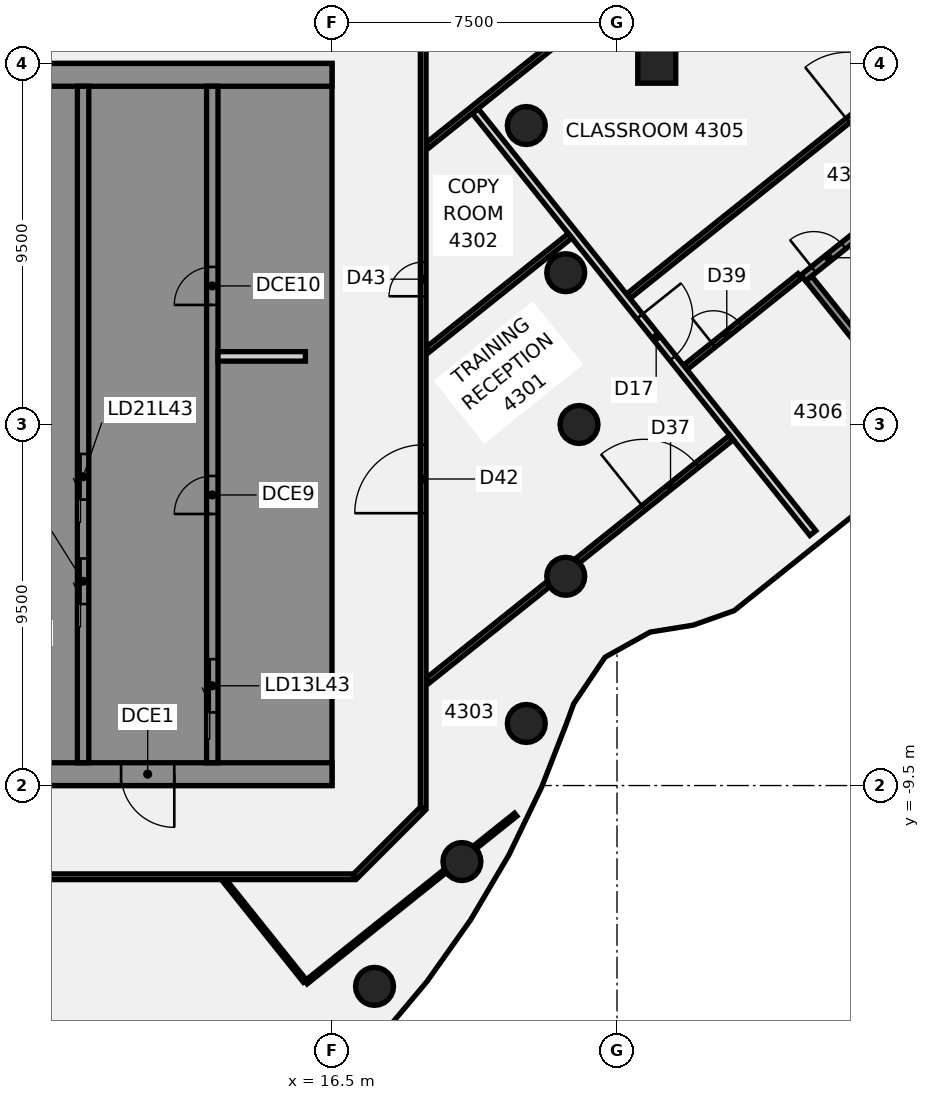
"""IFC4 building model, lengths in metres.
Left out: names, types, materials, properties, quantities, classifications, styles, units other than length and angle.
Written with IfcOpenShell. Run it as: python <this file> out.ifc"""

import sys

from ifc_helpers import new_model, si_unit, direction, frame, frame_2d, origin, origin_2d, place, context, subcontext, project, spatial, polyline, rectangle, circle, outline, extrude, element, fill, save


model = new_model("IFC4")
c1 = context("Model", 3, precision=1e-05, world=origin(), true_north=direction((0.0, 1.0)))
c2 = subcontext(c1, "Body", "Model", "MODEL_VIEW")
j1 = project(units=[si_unit("LENGTHUNIT", "METRE"), si_unit("PLANEANGLEUNIT", "RADIAN")], contexts=[c1])
p1 = place(None, origin())
s1 = spatial("IfcSite", under=j1, at=p1, CompositionType="ELEMENT")
p2 = place(p1, origin())
s2 = spatial("IfcBuilding", under=s1, at=p2, CompositionType="ELEMENT")
p3 = place(p2, frame((0.0, 0.0, 174.25)))
s3 = spatial("IfcBuildingStorey", under=s2, at=p3, CompositionType="ELEMENT", Elevation=174.25)
for number, where, z_axis, x_axis in (
    (1, (23.0, 0.0, -0.14), (0.0, 0.0, 1.0), (1.0, 0.0, 0.0)),
    (2, (22.651, 3.994, -0.14), (0.0, 0.0, 1.0), (1.0, 0.0, 0.0)),
    (3, (21.613, 7.866, -0.14), (0.0, 0.0, 1.0), (1.0, 0.0, 0.0)),
    (4, (17.619, -14.784, -0.14), (0.0, 0.0, 1.0), (1.0, 0.0, 0.0)),
    (5, (19.919, -11.5, -0.14), (0.0, 0.0, 1.0), (1.0, 0.0, 0.0)),
    (6, (21.613, -7.866, -0.14), (0.0, 0.0, 1.0), (1.0, 0.0, 0.0)),
    (7, (22.651, -3.994, -0.14), (0.0, 0.0, 1.0), (1.0, 0.0, 0.0)),
):
    element("IfcColumn", number, at=place(p3, frame(where, z_axis=z_axis, x_axis=x_axis)), inside=s3, PredefinedType="COLUMN", context=c2, shape_type="SweptSolid", body=[
        extrude(circle(Radius=0.5, at=origin_2d()), origin(), (0.0, 0.0, 1.0), 3.71),
    ])
p4 = place(p3, frame((25.046, 9.48, -0.139), z_axis=(-0.04664661088, 0.014535771096, 0.998805689337), x_axis=(0.623471160902, -0.780797686808, 0.040480659568)))
e8 = element("IfcColumn", 8, at=p4, inside=s3, PredefinedType="COLUMN", context=c2, shape_type="SweptSolid", body=[
    extrude(rectangle(XDim=1.0, YDim=1.0, at=origin_2d()), origin(), (0.0, 0.0, 1.0), 3.695),
])
p5 = place(p3, frame((1.725, -11.99, 0.0), z_axis=(0.0, 0.0, 1.0), x_axis=(0.624690839768, -0.780872175654, 0.0)))
e9 = element("IfcWall", 9, at=p5, inside=s3, PredefinedType="PARTITIONING", context=c2, shape_type="SweptSolid", body=[
    extrude(rectangle(XDim=14.152, YDim=0.1, at=frame_2d((7.076, 0.0))), origin(), (0.0, 0.0, 1.0), 2.97),
])
p6 = place(p3, frame((13.663, -11.99, 0.0), z_axis=(0.0, 0.0, 1.0), x_axis=(0.624651201182, -0.780903884522, 0.0)))
e10 = element("IfcWall", 10, at=p6, inside=s3, PredefinedType="PARTITIONING", context=c2, shape_type="SweptSolid", body=[
    extrude(rectangle(XDim=3.395, YDim=0.1, at=frame_2d((1.698, 0.0))), origin(), (0.0, 0.0, 1.0), 2.97),
])
p7 = place(p3, frame((20.27, 8.247, 0.0), z_axis=(0.0, 0.0, 1.0), x_axis=(0.624684578179, -0.780877184828, 0.0)))
e11 = element("IfcWall", 11, at=p7, inside=s3, PredefinedType="PARTITIONING", context=c2, shape_type="SweptSolid", body=[
    extrude(rectangle(XDim=14.219, YDim=0.2, at=frame_2d((7.11, 0.0))), origin(), (0.0, 0.0, 1.0), 2.87),
])
p8 = place(p7, frame((6.92, 0.0, 0.0)))
e12 = element("IfcOpeningElement", 12, at=p8, cuts=e11, PredefinedType="OPENING", context=c2, shape_type="SweptSolid", body=[
    extrude(rectangle(XDim=1.4, YDim=2.1, at=frame_2d((0.7, 1.05))), frame((0.0, 0.11, 0.0), z_axis=(0.0, -1.0, 0.0), x_axis=(1.0, 0.0, 0.0)), (0.0, 0.0, 1.0), 0.22),
])
p9 = place(p3, frame((-17.1, -11.9, 0.0), z_axis=(0.0, 0.0, 1.0), x_axis=(1.0, 0.0, 0.0)))
e13 = element("IfcWall", 13, at=p9, inside=s3, PredefinedType="PARTITIONING", context=c2, shape_type="SweptSolid", body=[
    extrude(rectangle(XDim=34.165, YDim=0.15, at=frame_2d((17.083, 0.0))), origin(), (0.0, 0.0, 1.0), 2.97),
])
p10 = place(p9, frame((9.414, 0.0, 0.0)))
e14 = element("IfcOpeningElement", 14, at=p10, cuts=e13, PredefinedType="OPENING", context=c2, shape_type="SweptSolid", body=[
    extrude(rectangle(XDim=1.8, YDim=2.1, at=frame_2d((0.9, 1.05))), frame((0.0, 0.085, 0.0), z_axis=(0.0, -1.0, 0.0), x_axis=(1.0, 0.0, 0.0)), (0.0, 0.0, 1.0), 0.17),
])
p11 = place(p9, frame((2.1, 0.0, 0.0)))
e15 = element("IfcOpeningElement", 15, at=p11, cuts=e13, PredefinedType="OPENING", context=c2, shape_type="SweptSolid", body=[
    extrude(rectangle(XDim=1.8, YDim=2.1, at=frame_2d((0.9, 1.05))), frame((0.0, 0.085, 0.0), z_axis=(0.0, -1.0, 0.0), x_axis=(1.0, 0.0, 0.0)), (0.0, 0.0, 1.0), 0.17),
])
p12 = place(p9, frame((23.853, 0.0, 0.0)))
e16 = element("IfcOpeningElement", 16, at=p12, cuts=e13, PredefinedType="OPENING", context=c2, shape_type="SweptSolid", body=[
    extrude(rectangle(XDim=1.8, YDim=2.1, at=frame_2d((0.9, 1.05))), frame((0.0, 0.085, 0.0), z_axis=(0.0, -1.0, 0.0), x_axis=(1.0, 0.0, 0.0)), (0.0, 0.0, 1.0), 0.17),
])
p13 = place(p3, frame((15.815, -14.68, 0.0), z_axis=(0.0, 0.0, 1.0), x_axis=(0.780939933327, 0.624606132323, 0.0)))
e17 = element("IfcWall", 17, at=p13, inside=s3, PredefinedType="PARTITIONING", context=c2, shape_type="SweptSolid", body=[
    extrude(rectangle(XDim=4.688, YDim=0.1, at=frame_2d((2.344, 0.0))), origin(), (0.0, 0.0, 1.0), 2.97),
])
p14 = place(p3, frame((20.249, -11.134, 0.0), z_axis=(0.0, 0.0, 1.0), x_axis=(0.780920261551, 0.62463072699, 0.0)))
e18 = element("IfcWall", 18, at=p14, inside=s3, PredefinedType="PARTITIONING", context=c2, shape_type="SweptSolid", body=[
    extrude(rectangle(XDim=1.389, YDim=0.1, at=frame_2d((0.694, 0.0))), origin(), (0.0, 0.0, 1.0), 2.97),
])
p15 = place(p3, frame((19.005, -6.75, 0.0), z_axis=(0.0, 0.0, 1.0), x_axis=(0.780862978875, 0.624702335694, 0.0)))
e19 = element("IfcWall", 19, at=p15, inside=s3, PredefinedType="PARTITIONING", context=c2, shape_type="SweptSolid", body=[
    extrude(rectangle(XDim=4.085, YDim=0.15, at=frame_2d((2.042, 0.0))), origin(), (0.0, 0.0, 1.0), 2.97),
])
p16 = place(p3, frame((22.948, -3.595, 0.0), z_axis=(0.0, 0.0, 1.0), x_axis=(0.780855081302, 0.624712207344, 0.0)))
e20 = element("IfcWall", 20, at=p16, inside=s3, PredefinedType="PARTITIONING", context=c2, shape_type="SweptSolid", body=[
    extrude(rectangle(XDim=5.205, YDim=0.15, at=frame_2d((2.603, 0.0))), origin(), (0.0, 0.0, 1.0), 2.97),
])
p17 = place(p16, frame((2.25, 0.0, 0.0)))
e21 = element("IfcOpeningElement", 21, at=p17, cuts=e20, PredefinedType="OPENING", context=c2, shape_type="SweptSolid", body=[
    extrude(rectangle(XDim=1.8, YDim=2.1, at=frame_2d((0.9, 1.05))), frame((0.0, 0.085, 0.0), z_axis=(0.0, -1.0, 0.0), x_axis=(1.0, 0.0, 0.0)), (0.0, 0.0, 1.0), 0.17),
])
p18 = place(p3, frame((19.005, 1.958, 0.0), z_axis=(0.0, 0.0, 1.0), x_axis=(0.780878701352, 0.624682682468, 0.0)))
e22 = element("IfcWall", 22, at=p18, inside=s3, PredefinedType="PARTITIONING", context=c2, shape_type="SweptSolid", body=[
    extrude(rectangle(XDim=4.816, YDim=0.15, at=frame_2d((2.408, 0.0))), origin(), (0.0, 0.0, 1.0), 2.87),
])
p19 = place(p3, frame((19.005, 7.337, 0.0), z_axis=(0.0, 0.0, 1.0), x_axis=(0.780882638199, 0.624677761217, 0.0)))
e23 = element("IfcWall", 23, at=p19, inside=s3, PredefinedType="PARTITIONING", context=c2, shape_type="SweptSolid", body=[
    extrude(rectangle(XDim=5.167, YDim=0.15, at=frame_2d((2.583, 0.0))), origin(), (0.0, 0.0, 1.0), 2.97),
])
p20 = place(p3, frame((24.312, 3.386, 0.0), z_axis=(0.0, 0.0, 1.0), x_axis=(0.78088671793, 0.624672661287, 0.0)))
e24 = element("IfcWall", 24, at=p20, inside=s3, PredefinedType="PARTITIONING", context=c2, shape_type="SweptSolid", body=[
    extrude(rectangle(XDim=13.3, YDim=0.15, at=frame_2d((6.65, 0.0))), origin(), (0.0, 0.0, 1.0), 2.87),
])
p21 = place(p20, frame((7.38, 0.0, 0.0)))
e25 = element("IfcOpeningElement", 25, at=p21, cuts=e24, PredefinedType="OPENING", context=c2, shape_type="SweptSolid", body=[
    extrude(rectangle(XDim=1.8, YDim=2.1, at=frame_2d((0.9, 1.05))), frame((0.0, 0.085, 0.0), z_axis=(0.0, -1.0, 0.0), x_axis=(1.0, 0.0, 0.0)), (0.0, 0.0, 1.0), 0.17),
])
p22 = place(p3, frame((25.811, 1.512, 0.0), z_axis=(0.0, 0.0, 1.0), x_axis=(0.780881214, 0.624679541542, 0.0)))
e26 = element("IfcWall", 26, at=p22, inside=s3, PredefinedType="PARTITIONING", context=c2, shape_type="SweptSolid", body=[
    extrude(rectangle(XDim=3.84, YDim=0.15, at=frame_2d((1.92, 0.0))), origin(), (0.0, 0.0, 1.0), 2.87),
])
p23 = place(p22, frame((0.93, 0.0, 0.0)))
e27 = element("IfcOpeningElement", 27, at=p23, cuts=e26, PredefinedType="OPENING", context=c2, shape_type="SweptSolid", body=[
    extrude(rectangle(XDim=0.9, YDim=2.1, at=frame_2d((0.45, 1.05))), frame((0.0, 0.085, 0.0), z_axis=(0.0, -1.0, 0.0), x_axis=(1.0, 0.0, 0.0)), (0.0, 0.0, 1.0), 0.17),
])
p24 = place(p3, frame((17.1, -11.9, 0.0), z_axis=(0.0, 0.0, 1.0), x_axis=(0.707106781187, 0.707106781187, 0.0)))
e28 = element("IfcWall", 28, at=p24, inside=s3, PredefinedType="PARTITIONING", context=c2, shape_type="SweptSolid", body=[
    extrude(rectangle(XDim=2.505, YDim=0.15, at=frame_2d((1.253, 0.0))), origin(), (0.0, 0.0, 1.0), 2.97),
])
p25 = place(p3, frame((18.9, -10.1, 0.0), z_axis=(0.0, 0.0, 1.0), x_axis=(0.0, 1.0, 0.0)))
e29 = element("IfcWall", 29, at=p25, inside=s3, PredefinedType="PARTITIONING", context=c2, shape_type="SweptSolid", body=[
    extrude(rectangle(XDim=20.2, YDim=0.15, at=frame_2d((10.1, 0.0))), origin(), (0.0, 0.0, 1.0), 2.97),
])
p26 = place(p25, frame((7.766, 0.0, 0.0)))
e30 = element("IfcOpeningElement", 30, at=p26, cuts=e29, PredefinedType="OPENING", context=c2, shape_type="SweptSolid", body=[
    extrude(rectangle(XDim=1.8, YDim=2.1, at=frame_2d((0.9, 1.05))), frame((0.0, 0.085, 0.0), z_axis=(0.0, -1.0, 0.0), x_axis=(1.0, 0.0, 0.0)), (0.0, 0.0, 1.0), 0.17),
])
p27 = place(p25, frame((13.474, 0.0, 0.0)))
e31 = element("IfcOpeningElement", 31, at=p27, cuts=e29, PredefinedType="OPENING", context=c2, shape_type="SweptSolid", body=[
    extrude(rectangle(XDim=0.9, YDim=2.1, at=frame_2d((0.45, 1.05))), frame((0.0, 0.085, 0.0), z_axis=(0.0, -1.0, 0.0), x_axis=(1.0, 0.0, 0.0)), (0.0, 0.0, 1.0), 0.17),
])
p28 = place(p3, frame((16.5, -9.2, 0.0), z_axis=(0.0, 0.0, 1.0), x_axis=(-1.0, 0.0, 0.0)))
e32 = element("IfcWall", 32, at=p28, inside=s3, PredefinedType="SHEAR", context=c2, shape_type="SweptSolid", body=[
    extrude(rectangle(XDim=13.0, YDim=0.6, at=frame_2d((6.5, 0.0))), origin(), (0.0, 0.0, 1.0), 3.57),
])
p29 = place(p28, frame((4.15, 0.0, 0.0)))
e33 = element("IfcOpeningElement", 33, at=p29, cuts=e32, PredefinedType="OPENING", context=c2, shape_type="SweptSolid", body=[
    extrude(rectangle(XDim=1.4, YDim=2.1, at=frame_2d((0.7, 1.05))), frame((0.0, 0.31, 0.0), z_axis=(0.0, -1.0, 0.0), x_axis=(1.0, 0.0, 0.0)), (0.0, 0.0, 1.0), 0.62),
])
p30 = place(p28, frame((10.125, 0.0, 0.0)))
e34 = element("IfcOpeningElement", 34, at=p30, cuts=e32, PredefinedType="OPENING", context=c2, shape_type="SweptSolid", body=[
    extrude(rectangle(XDim=1.4, YDim=2.1, at=frame_2d((0.7, 1.05))), frame((0.0, 0.31, 0.0), z_axis=(0.0, -1.0, 0.0), x_axis=(1.0, 0.0, 0.0)), (0.0, 0.0, 1.0), 0.62),
])
p31 = place(p3, origin())
e35 = element("IfcWall", 35, at=p31, inside=s3, PredefinedType="SHEAR", context=c2, shape_type="SweptSolid", body=[
    extrude(outline(polyline([(13.5, -8.125), (13.5, -8.9), (15.9, -8.9), (16.5, -8.9), (16.5, 8.9), (15.9, 8.9), (13.5, 8.9), (13.5, 8.125), (15.9, 8.125), (15.9, 5.625), (13.5, 5.625), (13.5, 5.375), (15.9, 5.375), (15.9, -5.375), (13.5, -5.375), (13.5, -5.625), (15.9, -5.625), (15.9, -8.125), (13.5, -8.125)])), origin(), (0.0, 0.0, 1.0), 3.57),
])
p32 = place(p3, frame((16.5, 9.2, 0.0), z_axis=(0.0, 0.0, 1.0), x_axis=(-1.0, 0.0, 0.0)))
e36 = element("IfcWall", 36, at=p32, inside=s3, PredefinedType="SHEAR", context=c2, shape_type="SweptSolid", body=[
    extrude(rectangle(XDim=13.0, YDim=0.6, at=frame_2d((6.5, 0.0))), origin(), (0.0, 0.0, 1.0), 3.57),
])
p33 = place(p3, origin())
e37 = element("IfcWall", 37, at=p33, inside=s3, PredefinedType="SHEAR", context=c2, shape_type="SweptSolid", body=[
    extrude(outline(polyline([(9.8, -5.375), (7.5, -5.375), (7.5, -2.875), (9.8, -2.875), (9.8, -2.625), (7.5, -2.625), (7.5, -0.125), (9.8, -0.125), (9.8, 0.125), (7.5, 0.125), (7.5, 2.625), (9.8, 2.625), (9.8, 2.875), (7.5, 2.875), (7.5, 5.375), (9.8, 5.375), (9.8, 5.625), (7.5, 5.625), (7.5, 8.125), (9.8, 8.125), (9.8, 8.9), (7.5, 8.9), (7.2, 8.9), (7.2, -5.625), (7.5, -5.625), (9.8, -5.625), (9.8, -5.375)])), origin(), (0.0, 0.0, 1.0), 3.57),
])
p34 = place(p3, origin())
e38 = element("IfcWall", 38, at=p34, inside=s3, PredefinedType="SHEAR", context=c2, shape_type="SweptSolid", body=[
    extrude(outline(polyline([(7.5, -8.125), (7.5, -8.9), (9.8, -8.9), (9.8, -8.125), (9.8, -5.625), (9.55, -5.625), (9.55, -8.125), (7.5, -8.125)])), origin(), (0.0, 0.0, 1.0), 3.57),
])
p35 = place(p3, frame((13.35, -8.9, 0.0), z_axis=(0.0, 0.0, 1.0), x_axis=(0.0, 1.0, 0.0)))
e39 = element("IfcWall", 39, at=p35, inside=s3, PredefinedType="SHEAR", context=c2, shape_type="SweptSolid", body=[
    extrude(rectangle(XDim=17.8, YDim=0.3, at=frame_2d((8.9, 0.0))), origin(), (0.0, 0.0, 1.0), 3.57),
])
p36 = place(p35, frame((1.325, 0.0, 0.0)))
e40 = element("IfcOpeningElement", 40, at=p36, cuts=e39, PredefinedType="OPENING", context=c2, shape_type="SweptSolid", body=[
    extrude(rectangle(XDim=1.4, YDim=2.1, at=frame_2d((0.7, 1.05))), frame((0.0, 0.16, 0.0), z_axis=(0.0, -1.0, 0.0), x_axis=(1.0, 0.0, 0.0)), (0.0, 0.0, 1.0), 0.32),
])
p37 = place(p35, frame((6.546, 0.0, 0.0)))
e41 = element("IfcOpeningElement", 41, at=p37, cuts=e39, PredefinedType="OPENING", context=c2, shape_type="SweptSolid", body=[
    extrude(rectangle(XDim=1.0, YDim=2.1, at=frame_2d((0.5, 1.05))), frame((0.0, 0.16, 0.0), z_axis=(0.0, -1.0, 0.0), x_axis=(1.0, 0.0, 0.0)), (0.0, 0.0, 1.0), 0.32),
])
p38 = place(p35, frame((12.046, 0.0, 0.0)))
e42 = element("IfcOpeningElement", 42, at=p38, cuts=e39, PredefinedType="OPENING", context=c2, shape_type="SweptSolid", body=[
    extrude(rectangle(XDim=1.0, YDim=2.1, at=frame_2d((0.5, 1.05))), frame((0.0, 0.16, 0.0), z_axis=(0.0, -1.0, 0.0), x_axis=(1.0, 0.0, 0.0)), (0.0, 0.0, 1.0), 0.32),
])
p39 = place(p3, frame((9.95, -8.9, 0.0), z_axis=(0.0, 0.0, 1.0), x_axis=(0.0, 1.0, 0.0)))
e43 = element("IfcWall", 43, at=p39, inside=s3, PredefinedType="SHEAR", context=c2, shape_type="SweptSolid", body=[
    extrude(rectangle(XDim=17.8, YDim=0.3, at=frame_2d((8.9, 0.0))), origin(), (0.0, 0.0, 1.0), 3.57),
])
p40 = place(p39, frame((4.175, 0.0, 0.0)))
e44 = element("IfcOpeningElement", 44, at=p40, cuts=e43, PredefinedType="OPENING", context=c2, shape_type="SweptSolid", body=[
    extrude(rectangle(XDim=1.2, YDim=2.1, at=frame_2d((0.6, 1.05))), frame((0.0, 0.16, 0.0), z_axis=(0.0, -1.0, 0.0), x_axis=(1.0, 0.0, 0.0)), (0.0, 0.0, 1.0), 0.32),
])
p41 = place(p39, frame((6.925, 0.0, 0.0)))
e45 = element("IfcOpeningElement", 45, at=p41, cuts=e43, PredefinedType="OPENING", context=c2, shape_type="SweptSolid", body=[
    extrude(rectangle(XDim=1.2, YDim=2.1, at=frame_2d((0.6, 1.05))), frame((0.0, 0.16, 0.0), z_axis=(0.0, -1.0, 0.0), x_axis=(1.0, 0.0, 0.0)), (0.0, 0.0, 1.0), 0.32),
])
p42 = place(p3, frame((15.8, 1.792, 0.0), z_axis=(0.0, 0.0, 1.0), x_axis=(-1.0, 0.0, 0.0)))
e46 = element("IfcWall", 46, at=p42, inside=s3, PredefinedType="PARTITIONING", context=c2, shape_type="SweptSolid", body=[
    extrude(rectangle(XDim=2.3, YDim=0.25, at=frame_2d((1.15, 0.0))), origin(), (0.0, 0.0, 1.0), 3.57),
])
p43 = place(p3, frame((28.903, 3.857, -0.14), z_axis=(0.0, 0.0, 1.0), x_axis=(0.780886584222, 0.624672828433, 0.0)))
e47 = element("IfcWall", 47, at=p43, inside=s3, PredefinedType="SHEAR", context=c2, shape_type="SweptSolid", body=[
    extrude(rectangle(XDim=6.7, YDim=0.2, at=frame_2d((3.35, 0.0))), origin(), (0.0, 0.0, 1.0), 3.01),
])
p44 = place(p43, frame((0.35, 0.0, 0.0)))
e48 = element("IfcOpeningElement", 48, at=p44, cuts=e47, PredefinedType="OPENING", context=c2, shape_type="SweptSolid", body=[
    extrude(rectangle(XDim=1.0, YDim=2.1, at=frame_2d((0.5, 1.05))), frame((0.0, 0.11, 0.0), z_axis=(0.0, -1.0, 0.0), x_axis=(1.0, 0.0, 0.0)), (0.0, 0.0, 1.0), 0.22),
])
p45 = place(p3, frame((31.042, 1.343, -0.14), z_axis=(0.0, 0.0, 1.0), x_axis=(-0.624648523514, 0.780906026403, 0.0)))
e49 = element("IfcWall", 49, at=p45, inside=s3, PredefinedType="SHEAR", context=c2, shape_type="SweptSolid", body=[
    extrude(rectangle(XDim=3.2, YDim=0.2, at=frame_2d((1.6, 0.0))), origin(), (0.0, 0.0, 1.0), 3.01),
])
p46 = place(p8, frame((1.4, 0.0, 0.0), z_axis=(0.0, 0.0, 1.0), x_axis=(-1.0, 0.0, 0.0)))
e50 = element("IfcDoor", 50, at=p46, inside=s3, OperationType="DOUBLE_DOOR_SINGLE_SWING", PredefinedType="DOOR", context=c2, shape_type="SweptSolid", body=[
    extrude(rectangle(XDim=1.4, YDim=2.1, at=frame_2d((0.7, 1.05))), frame((0.0, 0.025, 0.0), z_axis=(0.0, -1.0, 0.0), x_axis=(1.0, 0.0, 0.0)), (0.0, 0.0, 1.0), 0.05),
])
fill(e12, e50)
p47 = place(p17, frame((1.8, 0.0, 0.0), z_axis=(0.0, 0.0, 1.0), x_axis=(-1.0, 0.0, 0.0)))
e51 = element("IfcDoor", 51, at=p47, inside=s3, OperationType="DOUBLE_DOOR_SINGLE_SWING", PredefinedType="DOOR", context=c2, shape_type="SweptSolid", body=[
    extrude(rectangle(XDim=1.8, YDim=2.1, at=frame_2d((0.9, 1.05))), frame((0.0, 0.025, 0.0), z_axis=(0.0, -1.0, 0.0), x_axis=(1.0, 0.0, 0.0)), (0.0, 0.0, 1.0), 0.05),
])
fill(e21, e51)
p48 = place(p21, frame((1.8, 0.0, 0.0), z_axis=(0.0, 0.0, 1.0), x_axis=(-1.0, 0.0, 0.0)))
e52 = element("IfcDoor", 52, at=p48, inside=s3, OperationType="DOUBLE_DOOR_SINGLE_SWING", PredefinedType="DOOR", context=c2, shape_type="SweptSolid", body=[
    extrude(rectangle(XDim=1.8, YDim=2.1, at=frame_2d((0.9, 1.05))), frame((0.0, 0.025, 0.0), z_axis=(0.0, -1.0, 0.0), x_axis=(1.0, 0.0, 0.0)), (0.0, 0.0, 1.0), 0.05),
])
fill(e25, e52)
p49 = place(p23, frame((0.9, 0.0, 0.0), z_axis=(0.0, 0.0, 1.0), x_axis=(-1.0, 0.0, 0.0)))
e53 = element("IfcDoor", 53, at=p49, inside=s3, OperationType="SINGLE_SWING_LEFT", PredefinedType="DOOR", context=c2, shape_type="SweptSolid", body=[
    extrude(rectangle(XDim=0.9, YDim=2.1, at=frame_2d((0.45, 1.05))), frame((0.0, 0.025, 0.0), z_axis=(0.0, -1.0, 0.0), x_axis=(1.0, 0.0, 0.0)), (0.0, 0.0, 1.0), 0.05),
])
fill(e27, e53)
p50 = place(p26, origin())
e54 = element("IfcDoor", 54, at=p50, inside=s3, OperationType="DOUBLE_DOOR_SINGLE_SWING", PredefinedType="DOOR", context=c2, shape_type="SweptSolid", body=[
    extrude(rectangle(XDim=1.8, YDim=2.1, at=frame_2d((0.9, 1.05))), frame((0.0, 0.025, 0.0), z_axis=(0.0, -1.0, 0.0), x_axis=(1.0, 0.0, 0.0)), (0.0, 0.0, 1.0), 0.05),
])
fill(e30, e54)
p51 = place(p27, frame((0.9, 0.0, 0.0), z_axis=(0.0, 0.0, 1.0), x_axis=(-1.0, 0.0, 0.0)))
e55 = element("IfcDoor", 55, at=p51, inside=s3, OperationType="SINGLE_SWING_RIGHT", PredefinedType="DOOR", context=c2, shape_type="SweptSolid", body=[
    extrude(rectangle(XDim=0.9, YDim=2.1, at=frame_2d((0.45, 1.05))), frame((0.0, 0.025, 0.0), z_axis=(0.0, -1.0, 0.0), x_axis=(1.0, 0.0, 0.0)), (0.0, 0.0, 1.0), 0.05),
])
fill(e31, e55)
p52 = place(p29, origin())
e56 = element("IfcDoor", 56, at=p52, inside=s3, OperationType="SINGLE_SWING_LEFT", PredefinedType="DOOR", context=c2, shape_type="SweptSolid", body=[
    extrude(rectangle(XDim=1.4, YDim=2.1, at=frame_2d((0.7, 1.05))), frame((0.0, 0.025, 0.0), z_axis=(0.0, -1.0, 0.0), x_axis=(1.0, 0.0, 0.0)), (0.0, 0.0, 1.0), 0.05),
])
fill(e33, e56)
p53 = place(p36, origin())
e57 = element("IfcDoor", 57, at=p53, inside=s3, OperationType="SLIDING_TO_LEFT", PredefinedType="DOOR", context=c2, shape_type="SweptSolid", body=[
    extrude(rectangle(XDim=1.4, YDim=2.1, at=frame_2d((0.7, 1.05))), frame((0.0, 0.025, 0.0), z_axis=(0.0, -1.0, 0.0), x_axis=(1.0, 0.0, 0.0)), (0.0, 0.0, 1.0), 0.05),
])
fill(e40, e57)
p54 = place(p40, origin())
e58 = element("IfcDoor", 58, at=p54, inside=s3, OperationType="SLIDING_TO_LEFT", PredefinedType="DOOR", context=c2, shape_type="SweptSolid", body=[
    extrude(rectangle(XDim=1.2, YDim=2.1, at=frame_2d((0.6, 1.05))), frame((0.0, 0.025, 0.0), z_axis=(0.0, -1.0, 0.0), x_axis=(1.0, 0.0, 0.0)), (0.0, 0.0, 1.0), 0.05),
])
fill(e44, e58)
p55 = place(p41, origin())
e59 = element("IfcDoor", 59, at=p55, inside=s3, OperationType="SLIDING_TO_LEFT", PredefinedType="DOOR", context=c2, shape_type="SweptSolid", body=[
    extrude(rectangle(XDim=1.2, YDim=2.1, at=frame_2d((0.6, 1.05))), frame((0.0, 0.025, 0.0), z_axis=(0.0, -1.0, 0.0), x_axis=(1.0, 0.0, 0.0)), (0.0, 0.0, 1.0), 0.05),
])
fill(e45, e59)
p56 = place(p37, origin())
e60 = element("IfcDoor", 60, at=p56, inside=s3, OperationType="SINGLE_SWING_LEFT", PredefinedType="DOOR", context=c2, shape_type="SweptSolid", body=[
    extrude(rectangle(XDim=1.0, YDim=2.1, at=frame_2d((0.5, 1.05))), frame((0.0, 0.025, 0.0), z_axis=(0.0, -1.0, 0.0), x_axis=(1.0, 0.0, 0.0)), (0.0, 0.0, 1.0), 0.05),
])
fill(e41, e60)
p57 = place(p38, origin())
e61 = element("IfcDoor", 61, at=p57, inside=s3, OperationType="SINGLE_SWING_LEFT", PredefinedType="DOOR", context=c2, shape_type="SweptSolid", body=[
    extrude(rectangle(XDim=1.0, YDim=2.1, at=frame_2d((0.5, 1.05))), frame((0.0, 0.025, 0.0), z_axis=(0.0, -1.0, 0.0), x_axis=(1.0, 0.0, 0.0)), (0.0, 0.0, 1.0), 0.05),
])
fill(e42, e61)
p58 = place(p44, origin())
e62 = element("IfcDoor", 62, at=p58, inside=s3, OperationType="SINGLE_SWING_LEFT", PredefinedType="DOOR", context=c2, shape_type="SweptSolid", body=[
    extrude(rectangle(XDim=1.0, YDim=2.1, at=frame_2d((0.5, 1.05))), frame((0.0, 0.025, 0.0), z_axis=(0.0, -1.0, 0.0), x_axis=(1.0, 0.0, 0.0)), (0.0, 0.0, 1.0), 0.05),
])
fill(e48, e62)
save(model, sys.argv[1])
